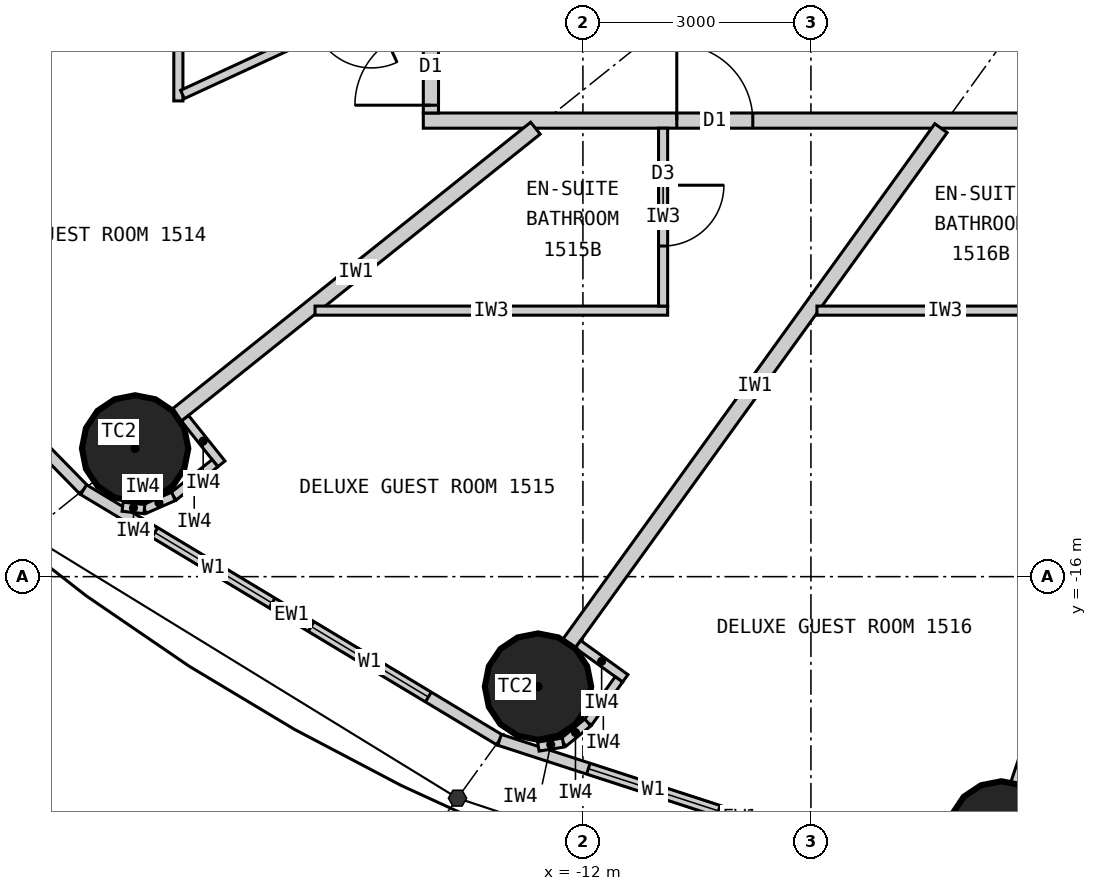
"""IFC4 building model, lengths in metres.
Left out: names, types, materials, properties, quantities, classifications, styles, units other than length and angle.
Written with IfcOpenShell. Run it as: python <this file> out.ifc"""

import sys

from ifc_helpers import new_model, si_unit, direction, frame, frame_2d, origin, origin_2d, place, context, subcontext, project, spatial, rectangle, circle, extrude, element, fill, save


model = new_model("IFC4")
c1 = context("Model", 3, precision=1e-05, world=origin(), true_north=direction((0.0, 1.0)))
c2 = subcontext(c1, "Body", "Model", "MODEL_VIEW")
j1 = project(units=[si_unit("LENGTHUNIT", "METRE"), si_unit("PLANEANGLEUNIT", "RADIAN")], contexts=[c1])
p1 = place(None, origin())
s1 = spatial("IfcSite", under=j1, at=p1, CompositionType="ELEMENT")
p2 = place(p1, origin())
s2 = spatial("IfcBuilding", under=s1, at=p2, CompositionType="ELEMENT")
p3 = place(p2, frame((0.0, 0.0, 63.9)))
s3 = spatial("IfcBuildingStorey", under=s2, at=p3, CompositionType="ELEMENT", Elevation=63.9)
for number, where, z_axis, x_axis in (
    (1, (-17.892, -14.313, 0.0), (0.0, 0.0, 1.0), (1.0, 0.0, 0.0)),
    (2, (-12.591, -17.447, 0.0), (0.0, 0.0, 1.0), (1.0, 0.0, 0.0)),
    (3, (-6.495, -19.391, 0.0), (0.0, 0.0, 1.0), (1.0, 0.0, 0.0)),
):
    element("IfcColumn", number, at=place(p3, frame(where, z_axis=z_axis, x_axis=x_axis)), inside=s3, PredefinedType="COLUMN", context=c2, shape_type="SweptSolid", body=[
        extrude(circle(Radius=0.7, at=origin_2d()), origin(), (0.0, 0.0, 1.0), 3.3),
    ])
p4 = place(p3, frame((-22.803, -10.532, 0.0), z_axis=(0.0, 0.0, 1.0), x_axis=(0.699602905915, -0.714531856557, 0.0)))
e4 = element("IfcWall", 4, at=p4, inside=s3, PredefinedType="ELEMENTEDWALL", context=c2, shape_type="SweptSolid", body=[
    extrude(rectangle(XDim=6.051, YDim=0.15, at=frame_2d((3.025, 0.0))), origin(), (0.0, 0.0, 1.0), 3.12),
])
p5 = place(p4, frame((0.926, 0.0, 0.9)))
e5 = element("IfcOpeningElement", 5, at=p5, cuts=e4, PredefinedType="OPENING", context=c2, shape_type="SweptSolid", body=[
    extrude(rectangle(XDim=1.8, YDim=1.9, at=frame_2d((0.9, 0.95))), frame((0.0, 0.085, 0.0), z_axis=(0.0, -1.0, 0.0), x_axis=(1.0, 0.0, 0.0)), (0.0, 0.0, 1.0), 0.17),
])
p6 = place(p4, frame((3.325, 0.0, 0.9)))
e6 = element("IfcOpeningElement", 6, at=p6, cuts=e4, PredefinedType="OPENING", context=c2, shape_type="SweptSolid", body=[
    extrude(rectangle(XDim=1.8, YDim=1.9, at=frame_2d((0.9, 0.95))), frame((0.0, 0.085, 0.0), z_axis=(0.0, -1.0, 0.0), x_axis=(1.0, 0.0, 0.0)), (0.0, 0.0, 1.0), 0.17),
])
p7 = place(p3, frame((-18.57, -14.856, 0.0), z_axis=(0.0, 0.0, 1.0), x_axis=(0.856983180864, -0.515344377787, 0.0)))
e7 = element("IfcWall", 7, at=p7, inside=s3, PredefinedType="ELEMENTEDWALL", context=c2, shape_type="SweptSolid", body=[
    extrude(rectangle(XDim=6.386, YDim=0.15, at=frame_2d((3.193, 0.0))), origin(), (0.0, 0.0, 1.0), 3.12),
])
p8 = place(p7, frame((1.093, 0.0, 0.9)))
e8 = element("IfcOpeningElement", 8, at=p8, cuts=e7, PredefinedType="OPENING", context=c2, shape_type="SweptSolid", body=[
    extrude(rectangle(XDim=1.8, YDim=1.9, at=frame_2d((0.9, 0.95))), frame((0.0, 0.085, 0.0), z_axis=(0.0, -1.0, 0.0), x_axis=(1.0, 0.0, 0.0)), (0.0, 0.0, 1.0), 0.17),
])
p9 = place(p7, frame((3.493, 0.0, 0.9)))
e9 = element("IfcOpeningElement", 9, at=p9, cuts=e7, PredefinedType="OPENING", context=c2, shape_type="SweptSolid", body=[
    extrude(rectangle(XDim=1.8, YDim=1.9, at=frame_2d((0.9, 0.95))), frame((0.0, 0.085, 0.0), z_axis=(0.0, -1.0, 0.0), x_axis=(1.0, 0.0, 0.0)), (0.0, 0.0, 1.0), 0.17),
])
p10 = place(p3, frame((-13.096, -18.147, 0.0), z_axis=(0.0, 0.0, 1.0), x_axis=(0.951137534625, -0.308767534285, 0.0)))
e10 = element("IfcWall", 10, at=p10, inside=s3, PredefinedType="ELEMENTEDWALL", context=c2, shape_type="SweptSolid", body=[
    extrude(rectangle(XDim=6.655, YDim=0.15, at=frame_2d((3.328, 0.0))), origin(), (0.0, 0.0, 1.0), 3.12),
])
p11 = place(p10, frame((1.228, 0.0, 0.9)))
e11 = element("IfcOpeningElement", 11, at=p11, cuts=e10, PredefinedType="OPENING", context=c2, shape_type="SweptSolid", body=[
    extrude(rectangle(XDim=1.8, YDim=1.9, at=frame_2d((0.9, 0.95))), frame((0.0, 0.085, 0.0), z_axis=(0.0, -1.0, 0.0), x_axis=(1.0, 0.0, 0.0)), (0.0, 0.0, 1.0), 0.17),
])
p12 = place(p10, frame((3.628, 0.0, 0.9)))
e12 = element("IfcOpeningElement", 12, at=p12, cuts=e10, PredefinedType="OPENING", context=c2, shape_type="SweptSolid", body=[
    extrude(rectangle(XDim=1.8, YDim=1.9, at=frame_2d((0.9, 0.95))), frame((0.0, 0.085, 0.0), z_axis=(0.0, -1.0, 0.0), x_axis=(1.0, 0.0, 0.0)), (0.0, 0.0, 1.0), 0.17),
])
p13 = place(p3, frame((14.1, -10.0, 0.0), z_axis=(0.0, 0.0, 1.0), x_axis=(-1.0, 0.0, 0.0)))
e13 = element("IfcWall", 13, at=p13, inside=s3, PredefinedType="PARTITIONING", context=c2, shape_type="SweptSolid", body=[
    extrude(rectangle(XDim=28.2, YDim=0.2, at=frame_2d((14.1, 0.0))), origin(), (0.0, 0.0, 1.0), 3.12),
])
p14 = place(p13, frame((23.865, 0.0, 0.0)))
e14 = element("IfcOpeningElement", 14, at=p14, cuts=e13, PredefinedType="OPENING", context=c2, shape_type="SweptSolid", body=[
    extrude(rectangle(XDim=1.0, YDim=2.2, at=frame_2d((0.5, 1.1))), frame((0.0, 0.11, 0.0), z_axis=(0.0, -1.0, 0.0), x_axis=(1.0, 0.0, 0.0)), (0.0, 0.0, 1.0), 0.22),
])
p15 = place(p13, frame((18.529, 0.0, 0.0)))
e15 = element("IfcOpeningElement", 15, at=p15, cuts=e13, PredefinedType="OPENING", context=c2, shape_type="SweptSolid", body=[
    extrude(rectangle(XDim=1.0, YDim=2.2, at=frame_2d((0.5, 1.1))), frame((0.0, 0.11, 0.0), z_axis=(0.0, -1.0, 0.0), x_axis=(1.0, 0.0, 0.0)), (0.0, 0.0, 1.0), 0.22),
])
p16 = place(p13, frame((14.623, 0.0, 0.0)))
e16 = element("IfcOpeningElement", 16, at=p16, cuts=e13, PredefinedType="OPENING", context=c2, shape_type="SweptSolid", body=[
    extrude(rectangle(XDim=1.0, YDim=2.2, at=frame_2d((0.5, 1.1))), frame((0.0, 0.11, 0.0), z_axis=(0.0, -1.0, 0.0), x_axis=(1.0, 0.0, 0.0)), (0.0, 0.0, 1.0), 0.22),
])
p17 = place(p13, frame((11.24, 0.0, 0.0)))
e17 = element("IfcOpeningElement", 17, at=p17, cuts=e13, PredefinedType="OPENING", context=c2, shape_type="SweptSolid", body=[
    extrude(rectangle(XDim=1.0, YDim=2.2, at=frame_2d((0.5, 1.1))), frame((0.0, 0.11, 0.0), z_axis=(0.0, -1.0, 0.0), x_axis=(1.0, 0.0, 0.0)), (0.0, 0.0, 1.0), 0.22),
])
p18 = place(p13, frame((8.671, 0.0, 0.0)))
e18 = element("IfcOpeningElement", 18, at=p18, cuts=e13, PredefinedType="OPENING", context=c2, shape_type="SweptSolid", body=[
    extrude(rectangle(XDim=1.0, YDim=2.2, at=frame_2d((0.5, 1.1))), frame((0.0, 0.11, 0.0), z_axis=(0.0, -1.0, 0.0), x_axis=(1.0, 0.0, 0.0)), (0.0, 0.0, 1.0), 0.22),
])
p19 = place(p13, frame((2.801, 0.0, 0.0)))
e19 = element("IfcOpeningElement", 19, at=p19, cuts=e13, PredefinedType="OPENING", context=c2, shape_type="SweptSolid", body=[
    extrude(rectangle(XDim=1.0, YDim=2.2, at=frame_2d((0.5, 1.1))), frame((0.0, 0.11, 0.0), z_axis=(0.0, -1.0, 0.0), x_axis=(1.0, 0.0, 0.0)), (0.0, 0.0, 1.0), 0.22),
])
p20 = place(p3, frame((-14.0, 9.9, 0.0), z_axis=(0.0, 0.0, 1.0), x_axis=(0.0, -1.0, 0.0)))
e20 = element("IfcWall", 20, at=p20, inside=s3, PredefinedType="PARTITIONING", context=c2, shape_type="SweptSolid", body=[
    extrude(rectangle(XDim=19.8, YDim=0.2, at=frame_2d((9.9, 0.0))), origin(), (0.0, 0.0, 1.0), 3.12),
])
p21 = place(p20, frame((0.103, 0.0, 0.0)))
e21 = element("IfcOpeningElement", 21, at=p21, cuts=e20, PredefinedType="OPENING", context=c2, shape_type="SweptSolid", body=[
    extrude(rectangle(XDim=1.0, YDim=2.2, at=frame_2d((0.5, 1.1))), frame((0.0, 0.11, 0.0), z_axis=(0.0, -1.0, 0.0), x_axis=(1.0, 0.0, 0.0)), (0.0, 0.0, 1.0), 0.22),
])
p22 = place(p20, frame((5.248, 0.0, 0.0)))
e22 = element("IfcOpeningElement", 22, at=p22, cuts=e20, PredefinedType="OPENING", context=c2, shape_type="SweptSolid", body=[
    extrude(rectangle(XDim=1.0, YDim=2.2, at=frame_2d((0.5, 1.1))), frame((0.0, 0.11, 0.0), z_axis=(0.0, -1.0, 0.0), x_axis=(1.0, 0.0, 0.0)), (0.0, 0.0, 1.0), 0.22),
])
p23 = place(p20, frame((9.438, 0.0, 0.0)))
e23 = element("IfcOpeningElement", 23, at=p23, cuts=e20, PredefinedType="OPENING", context=c2, shape_type="SweptSolid", body=[
    extrude(rectangle(XDim=1.0, YDim=2.2, at=frame_2d((0.5, 1.1))), frame((0.0, 0.11, 0.0), z_axis=(0.0, -1.0, 0.0), x_axis=(1.0, 0.0, 0.0)), (0.0, 0.0, 1.0), 0.22),
])
p24 = place(p20, frame((13.942, 0.0, 0.0)))
e24 = element("IfcOpeningElement", 24, at=p24, cuts=e20, PredefinedType="OPENING", context=c2, shape_type="SweptSolid", body=[
    extrude(rectangle(XDim=1.0, YDim=2.2, at=frame_2d((0.5, 1.1))), frame((0.0, 0.11, 0.0), z_axis=(0.0, -1.0, 0.0), x_axis=(1.0, 0.0, 0.0)), (0.0, 0.0, 1.0), 0.22),
])
p25 = place(p20, frame((18.698, 0.0, 0.0)))
e25 = element("IfcOpeningElement", 25, at=p25, cuts=e20, PredefinedType="OPENING", context=c2, shape_type="SweptSolid", body=[
    extrude(rectangle(XDim=1.0, YDim=2.2, at=frame_2d((0.5, 1.1))), frame((0.0, 0.11, 0.0), z_axis=(0.0, -1.0, 0.0), x_axis=(1.0, 0.0, 0.0)), (0.0, 0.0, 1.0), 0.22),
])
p26 = place(p3, frame((-14.1, -6.512, 0.0), z_axis=(0.0, 0.0, 1.0), x_axis=(-0.907832871056, -0.419332181247, 0.0)))
e26 = element("IfcWall", 26, at=p26, inside=s3, PredefinedType="PARTITIONING", context=c2, shape_type="SweptSolid", body=[
    extrude(rectangle(XDim=8.023, YDim=0.2, at=frame_2d((4.011, 0.0))), origin(), (0.0, 0.0, 1.0), 2.32),
])
p27 = place(p3, frame((-12.625, -10.1, 0.0), z_axis=(0.0, 0.0, 1.0), x_axis=(-0.780892451574, -0.624665493744, 0.0)))
e27 = element("IfcWall", 27, at=p27, inside=s3, PredefinedType="PARTITIONING", context=c2, shape_type="SweptSolid", body=[
    extrude(rectangle(XDim=6.045, YDim=0.2, at=frame_2d((3.022, 0.0))), origin(), (0.0, 0.0, 1.0), 2.32),
])
p28 = place(p3, frame((-7.289, -10.1, 0.0), z_axis=(0.0, 0.0, 1.0), x_axis=(-0.585198353053, -0.810890182197, 0.0)))
e28 = element("IfcWall", 28, at=p28, inside=s3, PredefinedType="PARTITIONING", context=c2, shape_type="SweptSolid", body=[
    extrude(rectangle(XDim=8.36, YDim=0.2, at=frame_2d((4.18, 0.0))), origin(), (0.0, 0.0, 1.0), 2.32),
])
p29 = place(p3, frame((-3.383, -10.1, 0.0), z_axis=(0.0, 0.0, 1.0), x_axis=(-0.31759592231, -0.948226149256, 0.0)))
e29 = element("IfcWall", 29, at=p29, inside=s3, PredefinedType="PARTITIONING", context=c2, shape_type="SweptSolid", body=[
    extrude(rectangle(XDim=9.098, YDim=0.2, at=frame_2d((4.549, 0.0))), origin(), (0.0, 0.0, 1.0), 2.32),
])
p30 = place(p3, frame((-17.323, -8.101, 0.0), z_axis=(0.0, 0.0, 1.0), x_axis=(0.0, -1.0, 0.0)))
e30 = element("IfcWall", 30, at=p30, inside=s3, PredefinedType="PARTITIONING", context=c2, shape_type="SweptSolid", body=[
    extrude(rectangle(XDim=1.64, YDim=0.12, at=frame_2d((0.82, 0.0))), origin(), (0.0, 0.0, 1.0), 3.12),
])
p31 = place(p3, frame((-14.1, -8.193, 0.0), z_axis=(0.0, 0.0, 1.0), x_axis=(-0.907836493557, -0.419324338628, 0.0)))
e31 = element("IfcWall", 31, at=p31, inside=s3, PredefinedType="PARTITIONING", context=c2, shape_type="SweptSolid", body=[
    extrude(rectangle(XDim=3.49, YDim=0.12, at=frame_2d((1.745, 0.0))), origin(), (0.0, 0.0, 1.0), 3.12),
])
p32 = place(p31, frame((0.75, 0.0, 0.0)))
e32 = element("IfcOpeningElement", 32, at=p32, cuts=e31, PredefinedType="OPENING", context=c2, shape_type="SweptSolid", body=[
    extrude(rectangle(XDim=0.8, YDim=2.1, at=frame_2d((0.4, 1.05))), frame((0.0, 0.07, 0.0), z_axis=(0.0, -1.0, 0.0), x_axis=(1.0, 0.0, 0.0)), (0.0, 0.0, 1.0), 0.14),
])
p33 = place(p3, frame((-15.525, -12.5, 0.0), z_axis=(0.0, 0.0, 1.0), x_axis=(1.0, 0.0, 0.0)))
e33 = element("IfcWall", 33, at=p33, inside=s3, PredefinedType="PARTITIONING", context=c2, shape_type="SweptSolid", body=[
    extrude(rectangle(XDim=4.64, YDim=0.12, at=frame_2d((2.32, 0.0))), origin(), (0.0, 0.0, 1.0), 3.12),
])
p34 = place(p3, frame((-10.945, -10.1, 0.0), z_axis=(0.0, 0.0, 1.0), x_axis=(0.0, -1.0, 0.0)))
e34 = element("IfcWall", 34, at=p34, inside=s3, PredefinedType="PARTITIONING", context=c2, shape_type="SweptSolid", body=[
    extrude(rectangle(XDim=2.34, YDim=0.12, at=frame_2d((1.17, 0.0))), origin(), (0.0, 0.0, 1.0), 3.12),
])
p35 = place(p34, frame((0.75, 0.0, 0.0)))
e35 = element("IfcOpeningElement", 35, at=p35, cuts=e34, PredefinedType="OPENING", context=c2, shape_type="SweptSolid", body=[
    extrude(rectangle(XDim=0.8, YDim=2.1, at=frame_2d((0.4, 1.05))), frame((0.0, 0.07, 0.0), z_axis=(0.0, -1.0, 0.0), x_axis=(1.0, 0.0, 0.0)), (0.0, 0.0, 1.0), 0.14),
])
p36 = place(p3, frame((-8.921, -12.5, 0.0), z_axis=(0.0, 0.0, 1.0), x_axis=(1.0, 0.0, 0.0)))
e36 = element("IfcWall", 36, at=p36, inside=s3, PredefinedType="PARTITIONING", context=c2, shape_type="SweptSolid", body=[
    extrude(rectangle(XDim=3.372, YDim=0.12, at=frame_2d((1.686, 0.0))), origin(), (0.0, 0.0, 1.0), 3.12),
])
p37 = place(p3, frame((-17.236, -13.917, 0.0), z_axis=(0.0, 0.0, 1.0), x_axis=(0.624695047554, -0.780868809443, 0.0)))
e37 = element("IfcWall", 37, at=p37, inside=s3, PredefinedType="PARTITIONING", context=c2, shape_type="SweptSolid", body=[
    extrude(rectangle(XDim=0.768, YDim=0.12, at=frame_2d((0.384, 0.0))), origin(), (0.0, 0.0, 1.0), 3.12),
])
p38 = place(p3, frame((-16.841, -14.507, 0.0), z_axis=(0.0, 0.0, 1.0), x_axis=(-0.780902834923, -0.62465251333, 0.0)))
e38 = element("IfcWall", 38, at=p38, inside=s3, PredefinedType="PARTITIONING", context=c2, shape_type="SweptSolid", body=[
    extrude(rectangle(XDim=0.7, YDim=0.12, at=frame_2d((0.35, 0.0))), origin(), (0.0, 0.0, 1.0), 3.12),
])
p39 = place(p3, frame((-17.387, -14.944, 0.0), z_axis=(0.0, 0.0, 1.0), x_axis=(-0.916036698064, -0.401094462441, 0.0)))
e39 = element("IfcWall", 39, at=p39, inside=s3, PredefinedType="PARTITIONING", context=c2, shape_type="SweptSolid", body=[
    extrude(rectangle(XDim=0.418, YDim=0.12, at=frame_2d((0.209, 0.0))), origin(), (0.0, 0.0, 1.0), 3.12),
])
p40 = place(p3, frame((-17.77, -15.112, 0.0), z_axis=(0.0, 0.0, 1.0), x_axis=(-0.993904401174, 0.110245368731, 0.0)))
e40 = element("IfcWall", 40, at=p40, inside=s3, PredefinedType="PARTITIONING", context=c2, shape_type="SweptSolid", body=[
    extrude(rectangle(XDim=0.288, YDim=0.12, at=frame_2d((0.144, 0.0))), origin(), (0.0, 0.0, 1.0), 3.12),
])
p41 = place(p3, frame((-12.065, -16.889, 0.0), z_axis=(0.0, 0.0, 1.0), x_axis=(0.810821798253, -0.585293098778, 0.0)))
e41 = element("IfcWall", 41, at=p41, inside=s3, PredefinedType="PARTITIONING", context=c2, shape_type="SweptSolid", body=[
    extrude(rectangle(XDim=0.768, YDim=0.12, at=frame_2d((0.384, 0.0))), origin(), (0.0, 0.0, 1.0), 3.12),
])
p42 = place(p3, frame((-11.526, -17.351, 0.0), z_axis=(0.0, 0.0, 1.0), x_axis=(-0.585223113993, -0.810872312296, 0.0)))
e42 = element("IfcWall", 42, at=p42, inside=s3, PredefinedType="PARTITIONING", context=c2, shape_type="SweptSolid", body=[
    extrude(rectangle(XDim=0.7, YDim=0.12, at=frame_2d((0.35, 0.0))), origin(), (0.0, 0.0, 1.0), 3.12),
])
p43 = place(p3, frame((-11.936, -17.919, 0.0), z_axis=(0.0, 0.0, 1.0), x_axis=(-0.775023088441, -0.631932917629, 0.0)))
e43 = element("IfcWall", 43, at=p43, inside=s3, PredefinedType="PARTITIONING", context=c2, shape_type="SweptSolid", body=[
    extrude(rectangle(XDim=0.418, YDim=0.12, at=frame_2d((0.209, 0.0))), origin(), (0.0, 0.0, 1.0), 3.12),
])
p44 = place(p3, frame((-12.26, -18.183, 0.0), z_axis=(0.0, 0.0, 1.0), x_axis=(-0.987218661664, -0.159371622511, 0.0)))
e44 = element("IfcWall", 44, at=p44, inside=s3, PredefinedType="PARTITIONING", context=c2, shape_type="SweptSolid", body=[
    extrude(rectangle(XDim=0.331, YDim=0.12, at=frame_2d((0.166, 0.0))), origin(), (0.0, 0.0, 1.0), 3.12),
])
p45 = place(p8, origin())
e45 = element("IfcWindow", 45, at=p45, inside=s3, PartitioningType="SINGLE_PANEL", PredefinedType="WINDOW", context=c2, shape_type="SweptSolid", body=[
    extrude(rectangle(XDim=1.8, YDim=1.9, at=frame_2d((0.9, 0.95))), frame((0.0, 0.03, 0.0), z_axis=(0.0, -1.0, 0.0), x_axis=(1.0, 0.0, 0.0)), (0.0, 0.0, 1.0), 0.06),
])
fill(e8, e45)
p46 = place(p9, origin())
e46 = element("IfcWindow", 46, at=p46, inside=s3, PartitioningType="SINGLE_PANEL", PredefinedType="WINDOW", context=c2, shape_type="SweptSolid", body=[
    extrude(rectangle(XDim=1.8, YDim=1.9, at=frame_2d((0.9, 0.95))), frame((0.0, 0.03, 0.0), z_axis=(0.0, -1.0, 0.0), x_axis=(1.0, 0.0, 0.0)), (0.0, 0.0, 1.0), 0.06),
])
fill(e9, e46)
p47 = place(p11, origin())
e47 = element("IfcWindow", 47, at=p47, inside=s3, PartitioningType="SINGLE_PANEL", PredefinedType="WINDOW", context=c2, shape_type="SweptSolid", body=[
    extrude(rectangle(XDim=1.8, YDim=1.9, at=frame_2d((0.9, 0.95))), frame((0.0, 0.03, 0.0), z_axis=(0.0, -1.0, 0.0), x_axis=(1.0, 0.0, 0.0)), (0.0, 0.0, 1.0), 0.06),
])
fill(e11, e47)
p48 = place(p25, origin())
e48 = element("IfcDoor", 48, at=p48, inside=s3, OperationType="SINGLE_SWING_RIGHT", PredefinedType="DOOR", context=c2, shape_type="SweptSolid", body=[
    extrude(rectangle(XDim=1.0, YDim=2.2, at=frame_2d((0.5, 1.1))), frame((0.0, 0.025, 0.0), z_axis=(0.0, -1.0, 0.0), x_axis=(1.0, 0.0, 0.0)), (0.0, 0.0, 1.0), 0.05),
])
fill(e25, e48)
p49 = place(p35, origin())
e49 = element("IfcDoor", 49, at=p49, inside=s3, OperationType="SINGLE_SWING_LEFT", PredefinedType="DOOR", context=c2, shape_type="SweptSolid", body=[
    extrude(rectangle(XDim=0.8, YDim=2.1, at=frame_2d((0.4, 1.05))), frame((0.0, 0.025, 0.0), z_axis=(0.0, -1.0, 0.0), x_axis=(1.0, 0.0, 0.0)), (0.0, 0.0, 1.0), 0.05),
])
fill(e35, e49)
p50 = place(p14, origin())
e50 = element("IfcDoor", 50, at=p50, inside=s3, OperationType="SINGLE_SWING_RIGHT", PredefinedType="DOOR", context=c2, shape_type="SweptSolid", body=[
    extrude(rectangle(XDim=1.0, YDim=2.2, at=frame_2d((0.5, 1.1))), frame((0.0, 0.025, 0.0), z_axis=(0.0, -1.0, 0.0), x_axis=(1.0, 0.0, 0.0)), (0.0, 0.0, 1.0), 0.05),
])
fill(e14, e50)
save(model, sys.argv[1])
